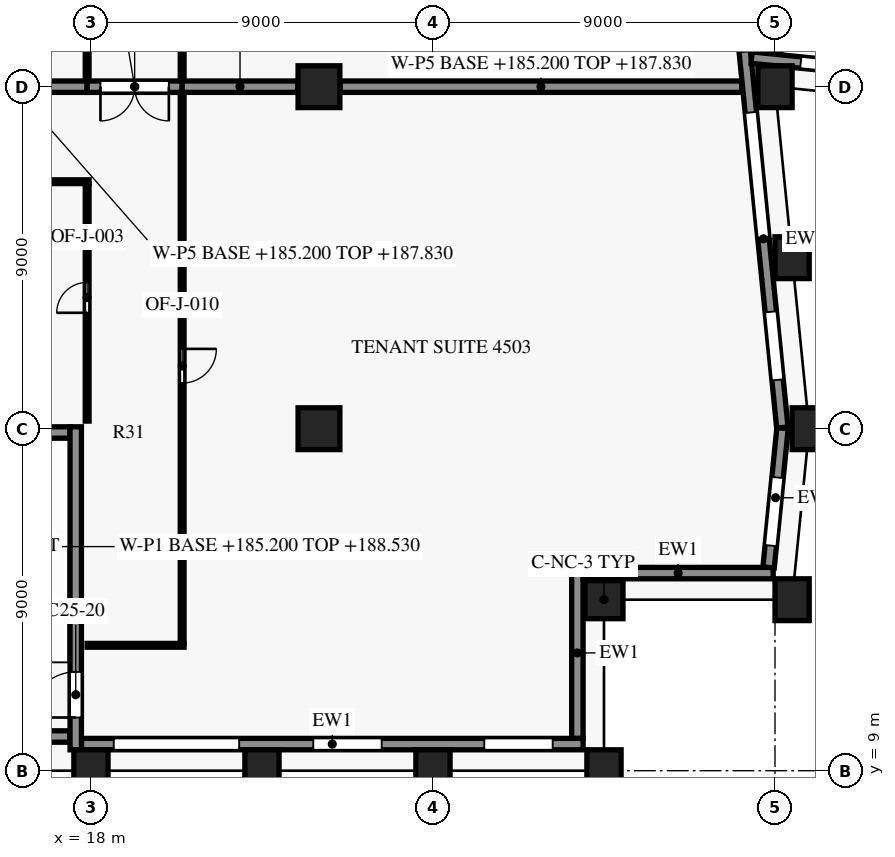
"""IFC4 building model, lengths in metres.
Left out: names, types, materials, properties, quantities, classifications, styles, units other than length and angle.
Written with IfcOpenShell. Run it as: python <this file> out.ifc"""

import sys

from ifc_helpers import new_model, si_unit, direction, frame, frame_2d, origin, origin_2d, place, context, subcontext, project, spatial, rectangle, extrude, element, fill, save


model = new_model("IFC4")
c1 = context("Model", 3, precision=1e-05, world=origin(), true_north=direction((0.0, 1.0)))
c2 = subcontext(c1, "Body", "Model", "MODEL_VIEW")
j1 = project(units=[si_unit("LENGTHUNIT", "METRE"), si_unit("PLANEANGLEUNIT", "RADIAN")], contexts=[c1])
p1 = place(None, origin())
s1 = spatial("IfcSite", under=j1, at=p1, CompositionType="ELEMENT")
p2 = place(p1, origin())
s2 = spatial("IfcBuilding", under=s1, at=p2, CompositionType="ELEMENT")
p3 = place(p2, frame((0.0, 0.0, 185.2)))
s3 = spatial("IfcBuildingStorey", under=s2, at=p3, CompositionType="ELEMENT", Elevation=185.2)
for number, where, z_axis, x_axis in (
    (1, (18.0, 9.0, 0.0), (0.0, 0.0, 1.0), (1.0, 0.0, 0.0)),
    (2, (22.5, 9.0, 0.0), (0.0, 0.0, 1.0), (1.0, 0.0, 0.0)),
    (3, (27.0, 9.0, 0.0), (0.0, 0.0, 1.0), (1.0, 0.0, 0.0)),
    (4, (31.5, 9.0, 0.0), (0.0, 0.0, 1.0), (1.0, 0.0, 0.0)),
    (5, (36.45, 13.5, 0.0), (0.0, 0.0, 1.0), (0.1, 0.995, 0.0)),
    (6, (36.9, 18.0, 0.0), (0.0, 0.0, 1.0), (0.0, 1.0, 0.0)),
    (7, (36.45, 22.5, 0.0), (0.0, 0.0, 1.0), (-0.1, 0.995, 0.0)),
    (8, (36.0, 27.0, 0.0), (0.0, 0.0, 1.0), (-0.1, 0.995, 0.0)),
):
    element("IfcColumn", number, at=place(p3, frame(where, z_axis=z_axis, x_axis=x_axis)), inside=s3, PredefinedType="COLUMN", context=c2, shape_type="SweptSolid", body=[
        extrude(rectangle(XDim=0.9, YDim=1.1, at=origin_2d()), origin(), (0.0, 0.0, 1.0), 3.8),
    ])
p4 = place(p3, frame((31.5, 13.5, 0.0), z_axis=(0.0, 0.0, 1.0), x_axis=(1.0, 0.0, 0.0)))
e9 = element("IfcColumn", 9, at=p4, inside=s3, PredefinedType="COLUMN", context=c2, shape_type="SweptSolid", body=[
    extrude(rectangle(XDim=1.0, YDim=1.0, at=origin_2d()), origin(), (0.0, 0.0, 1.0), 3.8),
])
for number, where, z_axis, x_axis in (
    (10, (24.0, 18.0, 0.0), (0.0, 0.0, 1.0), (1.0, 0.0, 0.0)),
    (11, (24.0, 27.0, 0.0), (0.0, 0.0, 1.0), (1.0, 0.0, 0.0)),
):
    element("IfcColumn", number, at=place(p3, frame(where, z_axis=z_axis, x_axis=x_axis)), inside=s3, PredefinedType="COLUMN", context=c2, shape_type="SweptSolid", body=[
        extrude(rectangle(XDim=1.1, YDim=1.1, at=origin_2d()), origin(), (0.0, 0.0, 1.0), 3.8),
    ])
p5 = place(p3, frame((30.95, 9.7, 0.0), z_axis=(0.0, 0.0, 1.0), x_axis=(-1.0, 0.0, 0.0)))
e12 = element("IfcWall", 12, at=p5, inside=s3, PredefinedType="SOLIDWALL", context=c2, shape_type="SweptSolid", body=[
    extrude(rectangle(XDim=13.2, YDim=0.3, at=frame_2d((6.6, 0.0))), origin(), (0.0, 0.0, 1.0), 3.15),
])
p6 = place(p5, frame((0.8, 0.0, 0.75)))
e13 = element("IfcOpeningElement", 13, at=p6, cuts=e12, PredefinedType="OPENING", context=c2, shape_type="SweptSolid", body=[
    extrude(rectangle(XDim=1.8, YDim=1.8, at=frame_2d((0.9, 0.9))), frame((0.0, 0.16, 0.0), z_axis=(0.0, -1.0, 0.0), x_axis=(1.0, 0.0, 0.0)), (0.0, 0.0, 1.0), 0.32),
])
p7 = place(p5, frame((5.3, 0.0, 0.75)))
e14 = element("IfcOpeningElement", 14, at=p7, cuts=e12, PredefinedType="OPENING", context=c2, shape_type="SweptSolid", body=[
    extrude(rectangle(XDim=1.8, YDim=1.8, at=frame_2d((0.9, 0.9))), frame((0.0, 0.16, 0.0), z_axis=(0.0, -1.0, 0.0), x_axis=(1.0, 0.0, 0.0)), (0.0, 0.0, 1.0), 0.32),
])
p8 = place(p5, frame((9.05, 0.0, 0.15)))
e15 = element("IfcOpeningElement", 15, at=p8, cuts=e12, PredefinedType="OPENING", context=c2, shape_type="SweptSolid", body=[
    extrude(rectangle(XDim=3.3, YDim=2.4, at=frame_2d((1.65, 1.2))), frame((0.0, 0.16, 0.0), z_axis=(0.0, -1.0, 0.0), x_axis=(1.0, 0.0, 0.0)), (0.0, 0.0, 1.0), 0.32),
])
p9 = place(p3, frame((30.8, 14.35, 0.0), z_axis=(0.0, 0.0, 1.0), x_axis=(0.0, -1.0, 0.0)))
e16 = element("IfcWall", 16, at=p9, inside=s3, PredefinedType="SOLIDWALL", context=c2, shape_type="SweptSolid", body=[
    extrude(rectangle(XDim=4.502, YDim=0.3, at=frame_2d((2.251, 0.0))), origin(), (0.0, 0.0, 1.0), 3.15),
])
p10 = place(p3, frame((35.952, 14.2, 0.0), z_axis=(0.0, 0.0, 1.0), x_axis=(-1.0, 0.0, 0.0)))
e17 = element("IfcWall", 17, at=p10, inside=s3, PredefinedType="SOLIDWALL", context=c2, shape_type="SweptSolid", body=[
    extrude(rectangle(XDim=5.002, YDim=0.3, at=frame_2d((2.501, 0.0))), origin(), (0.0, 0.0, 1.0), 3.15),
])
p11 = place(p3, frame((36.198, 18.015, 0.0), z_axis=(0.0, 0.0, 1.0), x_axis=(-0.099529980022, -0.99503456376, 0.0)))
e18 = element("IfcWall", 18, at=p11, inside=s3, PredefinedType="SOLIDWALL", context=c2, shape_type="SweptSolid", body=[
    extrude(rectangle(XDim=3.682, YDim=0.3, at=frame_2d((1.841, 0.0))), origin(), (0.0, 0.0, 1.0), 3.15),
])
p12 = place(p11, frame((1.306, 0.0, 0.75)))
e19 = element("IfcOpeningElement", 19, at=p12, cuts=e18, PredefinedType="OPENING", context=c2, shape_type="SweptSolid", body=[
    extrude(rectangle(XDim=1.8, YDim=1.8, at=frame_2d((0.9, 0.9))), frame((0.0, 0.16, 0.0), z_axis=(0.0, -1.0, 0.0), x_axis=(1.0, 0.0, 0.0)), (0.0, 0.0, 1.0), 0.32),
])
p13 = place(p3, frame((35.2, 27.964, 0.0), z_axis=(0.0, 0.0, 1.0), x_axis=(0.099501297882, -0.995037432321, 0.0)))
e20 = element("IfcWall", 20, at=p13, inside=s3, PredefinedType="SOLIDWALL", context=c2, shape_type="SweptSolid", body=[
    extrude(rectangle(XDim=9.984, YDim=0.3, at=frame_2d((4.992, 0.0))), origin(), (0.0, 0.0, 1.0), 3.15),
])
p14 = place(p13, frame((1.65, 0.0, 0.15)))
e21 = element("IfcOpeningElement", 21, at=p14, cuts=e20, PredefinedType="OPENING", context=c2, shape_type="SweptSolid", body=[
    extrude(rectangle(XDim=3.3, YDim=2.4, at=frame_2d((1.65, 1.2))), frame((0.0, 0.16, 0.0), z_axis=(0.0, -1.0, 0.0), x_axis=(1.0, 0.0, 0.0)), (0.0, 0.0, 1.0), 0.32),
])
p15 = place(p13, frame((6.923, 0.0, 0.75)))
e22 = element("IfcOpeningElement", 22, at=p15, cuts=e20, PredefinedType="OPENING", context=c2, shape_type="SweptSolid", body=[
    extrude(rectangle(XDim=1.8, YDim=1.8, at=frame_2d((0.9, 0.9))), frame((0.0, 0.16, 0.0), z_axis=(0.0, -1.0, 0.0), x_axis=(1.0, 0.0, 0.0)), (0.0, 0.0, 1.0), 0.32),
])
p16 = place(p3, frame((45.015, 26.802, 0.0), z_axis=(0.0, 0.0, 1.0), x_axis=(-0.995037689759, 0.099498723402, 0.0)))
e23 = element("IfcWall", 23, at=p16, inside=s3, PredefinedType="SOLIDWALL", context=c2, shape_type="SweptSolid", body=[
    extrude(rectangle(XDim=9.677, YDim=0.3, at=frame_2d((4.839, 0.0))), origin(), (0.0, 0.0, 1.0), 3.15),
])
p17 = place(p16, frame((1.306, 0.0, 0.75)))
e24 = element("IfcOpeningElement", 24, at=p17, cuts=e23, PredefinedType="OPENING", context=c2, shape_type="SweptSolid", body=[
    extrude(rectangle(XDim=1.8, YDim=1.8, at=frame_2d((0.9, 0.9))), frame((0.0, 0.16, 0.0), z_axis=(0.0, -1.0, 0.0), x_axis=(1.0, 0.0, 0.0)), (0.0, 0.0, 1.0), 0.32),
])
p18 = place(p16, frame((5.079, 0.0, 0.15)))
e25 = element("IfcOpeningElement", 25, at=p18, cuts=e23, PredefinedType="OPENING", context=c2, shape_type="SweptSolid", body=[
    extrude(rectangle(XDim=3.3, YDim=2.4, at=frame_2d((1.65, 1.2))), frame((0.0, 0.16, 0.0), z_axis=(0.0, -1.0, 0.0), x_axis=(1.0, 0.0, 0.0)), (0.0, 0.0, 1.0), 0.32),
])
for number, where, z_axis, x_axis in (
    (26, (14.15, 9.9, 0.0), (0.0, 0.0, 1.0), (1.0, 0.0, 0.0)),
    (27, (14.15, 17.9, 0.0), (0.0, 0.0, 1.0), (1.0, 0.0, 0.0)),
):
    element("IfcWall", number, at=place(p3, frame(where, z_axis=z_axis, x_axis=x_axis)), inside=s3, PredefinedType="SHEAR", context=c2, shape_type="SweptSolid", body=[
        extrude(rectangle(XDim=3.3, YDim=0.3, at=frame_2d((1.65, 0.0))), origin(), (0.0, 0.0, 1.0), 3.5),
    ])
p19 = place(p3, frame((17.6, 9.55, 0.0), z_axis=(0.0, 0.0, 1.0), x_axis=(0.0, 1.0, 0.0)))
e28 = element("IfcWall", 28, at=p19, inside=s3, PredefinedType="SHEAR", context=c2, shape_type="SweptSolid", body=[
    extrude(rectangle(XDim=8.5, YDim=0.3, at=frame_2d((4.25, 0.0))), origin(), (0.0, 0.0, 1.0), 3.5),
])
p20 = place(p19, frame((0.85, 0.0, 0.0)))
e29 = element("IfcOpeningElement", 29, at=p20, cuts=e28, PredefinedType="OPENING", context=c2, shape_type="SweptSolid", body=[
    extrude(rectangle(XDim=1.2, YDim=2.2, at=frame_2d((0.6, 1.1))), frame((0.0, 0.16, 0.0), z_axis=(0.0, -1.0, 0.0), x_axis=(1.0, 0.0, 0.0)), (0.0, 0.0, 1.0), 0.32),
])
p21 = place(p3, frame((20.45, 12.3, 0.0), z_axis=(0.0, 0.0, 1.0), x_axis=(-1.0, 0.0, 0.0)))
e30 = element("IfcWall", 30, at=p21, inside=s3, PredefinedType="PARTITIONING", context=c2, shape_type="SweptSolid", body=[
    extrude(rectangle(XDim=2.55, YDim=0.1, at=frame_2d((1.275, 0.0))), origin(), (0.0, 0.0, 1.0), 2.63),
])
p22 = place(p3, frame((17.9, 18.2, 0.0), z_axis=(0.0, 0.0, 1.0), x_axis=(0.0, 1.0, 0.0)))
e31 = element("IfcWall", 31, at=p22, inside=s3, PredefinedType="PARTITIONING", context=c2, shape_type="SweptSolid", body=[
    extrude(rectangle(XDim=6.25, YDim=0.1, at=frame_2d((3.125, 0.0))), origin(), (0.0, 0.0, 1.0), 2.63),
])
p23 = place(p22, frame((2.85, 0.0, 0.0)))
e32 = element("IfcOpeningElement", 32, at=p23, cuts=e31, PredefinedType="OPENING", context=c2, shape_type="SweptSolid", body=[
    extrude(rectangle(XDim=0.8, YDim=2.1, at=frame_2d((0.4, 1.05))), frame((0.0, 0.06, 0.0), z_axis=(0.0, -1.0, 0.0), x_axis=(1.0, 0.0, 0.0)), (0.0, 0.0, 1.0), 0.12),
])
p24 = place(p3, frame((17.95, 24.5, 0.0), z_axis=(0.0, 0.0, 1.0), x_axis=(-1.0, 0.0, 0.0)))
e33 = element("IfcWall", 33, at=p24, inside=s3, PredefinedType="PARTITIONING", context=c2, shape_type="SweptSolid", body=[
    extrude(rectangle(XDim=4.0, YDim=0.1, at=frame_2d((2.0, 0.0))), origin(), (0.0, 0.0, 1.0), 2.63),
])
p25 = place(p3, frame((20.4, 26.83, 0.0), z_axis=(0.0, 0.0, 1.0), x_axis=(0.0, -1.0, 0.0)))
e34 = element("IfcWall", 34, at=p25, inside=s3, PredefinedType="PARTITIONING", context=c2, shape_type="SweptSolid", body=[
    extrude(rectangle(XDim=14.48, YDim=0.1, at=frame_2d((7.24, 0.0))), origin(), (0.0, 0.0, 1.0), 2.63),
])
p26 = place(p25, frame((6.73, 0.0, 0.0)))
e35 = element("IfcOpeningElement", 35, at=p26, cuts=e34, PredefinedType="OPENING", context=c2, shape_type="SweptSolid", body=[
    extrude(rectangle(XDim=0.9, YDim=2.1, at=frame_2d((0.45, 1.05))), frame((0.0, 0.06, 0.0), z_axis=(0.0, -1.0, 0.0), x_axis=(1.0, 0.0, 0.0)), (0.0, 0.0, 1.0), 0.12),
])
p27 = place(p3, frame((14.0, 27.0, 0.0), z_axis=(0.0, 0.0, 1.0), x_axis=(1.0, 0.0, 0.0)))
e36 = element("IfcWall", 36, at=p27, inside=s3, PredefinedType="PARTITIONING", context=c2, shape_type="SweptSolid", body=[
    extrude(rectangle(XDim=3.9, YDim=0.3, at=frame_2d((1.95, 0.0))), origin(), (0.0, 0.0, 1.0), 2.63),
])
p28 = place(p3, frame((20.4, 27.0, 0.0), z_axis=(0.0, 0.0, 1.0), x_axis=(-1.0, 0.0, 0.0)))
e37 = element("IfcWall", 37, at=p28, inside=s3, PredefinedType="PARTITIONING", context=c2, shape_type="SweptSolid", body=[
    extrude(rectangle(XDim=2.5, YDim=0.3, at=frame_2d((1.25, 0.0))), origin(), (0.0, 0.0, 1.0), 2.63),
])
p29 = place(p28, frame((0.35, 0.0, 0.0)))
e38 = element("IfcOpeningElement", 38, at=p29, cuts=e37, PredefinedType="OPENING", context=c2, shape_type="SweptSolid", body=[
    extrude(rectangle(XDim=1.8, YDim=2.1, at=frame_2d((0.9, 1.05))), frame((0.0, 0.16, 0.0), z_axis=(0.0, -1.0, 0.0), x_axis=(1.0, 0.0, 0.0)), (0.0, 0.0, 1.0), 0.32),
])
p30 = place(p3, frame((20.4, 27.0, 0.0), z_axis=(0.0, 0.0, 1.0), x_axis=(1.0, 0.0, 0.0)))
e39 = element("IfcWall", 39, at=p30, inside=s3, PredefinedType="PARTITIONING", context=c2, shape_type="SweptSolid", body=[
    extrude(rectangle(XDim=3.045, YDim=0.3, at=frame_2d((1.522, 0.0))), origin(), (0.0, 0.0, 1.0), 2.63),
])
p31 = place(p3, frame((24.555, 27.0, 0.0), z_axis=(0.0, 0.0, 1.0), x_axis=(1.0, 0.0, 0.0)))
e40 = element("IfcWall", 40, at=p31, inside=s3, PredefinedType="PARTITIONING", context=c2, shape_type="SweptSolid", body=[
    extrude(rectangle(XDim=10.571, YDim=0.3, at=frame_2d((5.285, 0.0))), origin(), (0.0, 0.0, 1.0), 2.63),
])
p32 = place(p3, frame((17.9, 27.17, 0.0), z_axis=(0.0, 0.0, 1.0), x_axis=(0.0, 1.0, 0.0)))
e41 = element("IfcWall", 41, at=p32, inside=s3, PredefinedType="PARTITIONING", context=c2, shape_type="SweptSolid", body=[
    extrude(rectangle(XDim=6.28, YDim=0.1, at=frame_2d((3.14, 0.0))), origin(), (0.0, 0.0, 1.0), 2.63),
])
p33 = place(p3, frame((36.0, 27.874, 0.0), z_axis=(0.0, 0.0, 1.0), x_axis=(0.0, 1.0, 0.0)))
e42 = element("IfcWall", 42, at=p33, inside=s3, PredefinedType="PARTITIONING", context=c2, shape_type="SweptSolid", body=[
    extrude(rectangle(XDim=4.076, YDim=0.3, at=frame_2d((2.038, 0.0))), origin(), (0.0, 0.0, 1.0), 2.63),
])
p34 = place(p3, frame((20.4, 33.45, 0.0), z_axis=(0.0, 0.0, 1.0), x_axis=(0.0, -1.0, 0.0)))
e43 = element("IfcWall", 43, at=p34, inside=s3, PredefinedType="PARTITIONING", context=c2, shape_type="SweptSolid", body=[
    extrude(rectangle(XDim=6.28, YDim=0.1, at=frame_2d((3.14, 0.0))), origin(), (0.0, 0.0, 1.0), 2.63),
])
p35 = place(p6, origin())
e44 = element("IfcWindow", 44, at=p35, inside=s3, PartitioningType="SINGLE_PANEL", PredefinedType="WINDOW", context=c2, shape_type="SweptSolid", body=[
    extrude(rectangle(XDim=1.8, YDim=1.8, at=frame_2d((0.9, 0.9))), frame((0.0, 0.03, 0.0), z_axis=(0.0, -1.0, 0.0), x_axis=(1.0, 0.0, 0.0)), (0.0, 0.0, 1.0), 0.06),
])
fill(e13, e44)
p36 = place(p7, origin())
e45 = element("IfcWindow", 45, at=p36, inside=s3, PartitioningType="SINGLE_PANEL", PredefinedType="WINDOW", context=c2, shape_type="SweptSolid", body=[
    extrude(rectangle(XDim=1.8, YDim=1.8, at=frame_2d((0.9, 0.9))), frame((0.0, 0.03, 0.0), z_axis=(0.0, -1.0, 0.0), x_axis=(1.0, 0.0, 0.0)), (0.0, 0.0, 1.0), 0.06),
])
fill(e14, e45)
p37 = place(p8, origin())
e46 = element("IfcWindow", 46, at=p37, inside=s3, PartitioningType="SINGLE_PANEL", PredefinedType="WINDOW", context=c2, shape_type="SweptSolid", body=[
    extrude(rectangle(XDim=3.3, YDim=2.4, at=frame_2d((1.65, 1.2))), frame((0.0, 0.03, 0.0), z_axis=(0.0, -1.0, 0.0), x_axis=(1.0, 0.0, 0.0)), (0.0, 0.0, 1.0), 0.06),
])
fill(e15, e46)
p38 = place(p12, origin())
e47 = element("IfcWindow", 47, at=p38, inside=s3, PartitioningType="SINGLE_PANEL", PredefinedType="WINDOW", context=c2, shape_type="SweptSolid", body=[
    extrude(rectangle(XDim=1.8, YDim=1.8, at=frame_2d((0.9, 0.9))), frame((0.0, 0.03, 0.0), z_axis=(0.0, -1.0, 0.0), x_axis=(1.0, 0.0, 0.0)), (0.0, 0.0, 1.0), 0.06),
])
fill(e19, e47)
p39 = place(p14, origin())
e48 = element("IfcWindow", 48, at=p39, inside=s3, PartitioningType="SINGLE_PANEL", PredefinedType="WINDOW", context=c2, shape_type="SweptSolid", body=[
    extrude(rectangle(XDim=3.3, YDim=2.4, at=frame_2d((1.65, 1.2))), frame((0.0, 0.03, 0.0), z_axis=(0.0, -1.0, 0.0), x_axis=(1.0, 0.0, 0.0)), (0.0, 0.0, 1.0), 0.06),
])
fill(e21, e48)
p40 = place(p15, origin())
e49 = element("IfcWindow", 49, at=p40, inside=s3, PartitioningType="SINGLE_PANEL", PredefinedType="WINDOW", context=c2, shape_type="SweptSolid", body=[
    extrude(rectangle(XDim=1.8, YDim=1.8, at=frame_2d((0.9, 0.9))), frame((0.0, 0.03, 0.0), z_axis=(0.0, -1.0, 0.0), x_axis=(1.0, 0.0, 0.0)), (0.0, 0.0, 1.0), 0.06),
])
fill(e22, e49)
p41 = place(p18, origin())
e50 = element("IfcWindow", 50, at=p41, inside=s3, PartitioningType="SINGLE_PANEL", PredefinedType="WINDOW", context=c2, shape_type="SweptSolid", body=[
    extrude(rectangle(XDim=3.3, YDim=2.4, at=frame_2d((1.65, 1.2))), frame((0.0, 0.03, 0.0), z_axis=(0.0, -1.0, 0.0), x_axis=(1.0, 0.0, 0.0)), (0.0, 0.0, 1.0), 0.06),
])
fill(e25, e50)
p42 = place(p20, origin())
e51 = element("IfcDoor", 51, at=p42, inside=s3, OperationType="SINGLE_SWING_LEFT", PredefinedType="DOOR", context=c2, shape_type="SweptSolid", body=[
    extrude(rectangle(XDim=1.2, YDim=2.2, at=frame_2d((0.6, 1.1))), frame((0.0, 0.025, 0.0), z_axis=(0.0, -1.0, 0.0), x_axis=(1.0, 0.0, 0.0)), (0.0, 0.0, 1.0), 0.05),
])
fill(e29, e51)
p43 = place(p23, origin())
e52 = element("IfcDoor", 52, at=p43, inside=s3, OperationType="SINGLE_SWING_LEFT", PredefinedType="DOOR", context=c2, shape_type="SweptSolid", body=[
    extrude(rectangle(XDim=0.8, YDim=2.1, at=frame_2d((0.4, 1.05))), frame((0.0, 0.025, 0.0), z_axis=(0.0, -1.0, 0.0), x_axis=(1.0, 0.0, 0.0)), (0.0, 0.0, 1.0), 0.05),
])
fill(e32, e52)
p44 = place(p26, origin())
e53 = element("IfcDoor", 53, at=p44, inside=s3, OperationType="SINGLE_SWING_LEFT", PredefinedType="DOOR", context=c2, shape_type="SweptSolid", body=[
    extrude(rectangle(XDim=0.9, YDim=2.1, at=frame_2d((0.45, 1.05))), frame((0.0, 0.025, 0.0), z_axis=(0.0, -1.0, 0.0), x_axis=(1.0, 0.0, 0.0)), (0.0, 0.0, 1.0), 0.05),
])
fill(e35, e53)
p45 = place(p29, origin())
e54 = element("IfcDoor", 54, at=p45, inside=s3, OperationType="DOUBLE_DOOR_SINGLE_SWING", PredefinedType="DOOR", context=c2, shape_type="SweptSolid", body=[
    extrude(rectangle(XDim=1.8, YDim=2.1, at=frame_2d((0.9, 1.05))), frame((0.0, 0.025, 0.0), z_axis=(0.0, -1.0, 0.0), x_axis=(1.0, 0.0, 0.0)), (0.0, 0.0, 1.0), 0.05),
])
fill(e38, e54)
save(model, sys.argv[1])
